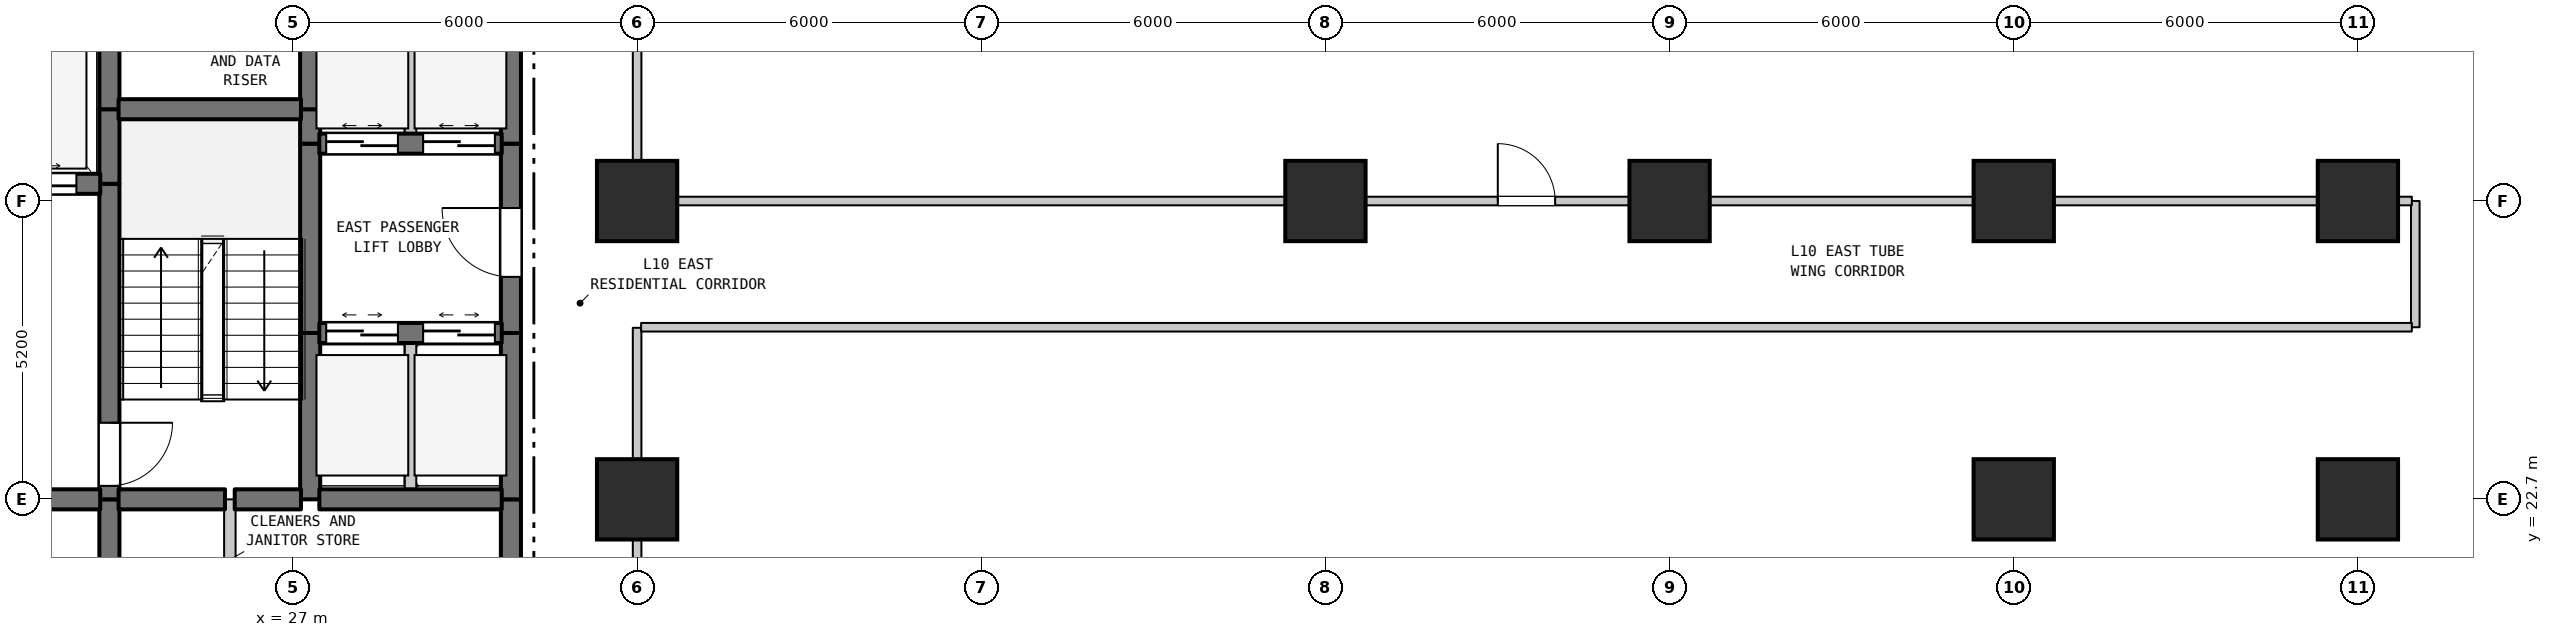
"""IFC4 building model, lengths in metres.
Left out: names, types, materials, properties, quantities, classifications, styles, units other than length and angle.
Written with IfcOpenShell. Run it as: python <this file> out.ifc"""

import sys

from ifc_helpers import new_model, si_unit, direction, frame, frame_2d, origin, origin_2d, place, context, subcontext, project, spatial, rectangle, extrude, element, fill, save


model = new_model("IFC4")
c1 = context("Model", 3, precision=1e-05, world=origin(), true_north=direction((0.0, 1.0)))
c2 = subcontext(c1, "Body", "Model", "MODEL_VIEW")
j1 = project(units=[si_unit("LENGTHUNIT", "METRE"), si_unit("PLANEANGLEUNIT", "RADIAN")], contexts=[c1])
p1 = place(None, origin())
s1 = spatial("IfcSite", under=j1, at=p1, CompositionType="ELEMENT")
p2 = place(p1, origin())
s2 = spatial("IfcBuilding", under=s1, at=p2, CompositionType="ELEMENT")
p3 = place(p2, frame((0.0, 0.0, 46.2)))
s3 = spatial("IfcBuildingStorey", under=s2, at=p3, CompositionType="ELEMENT", Elevation=46.2)
for number, where, z_axis, x_axis in (
    (1, (33.0, 22.7, 0.0), (0.0, 0.0, 1.0), (1.0, 0.0, 0.0)),
    (2, (33.0, 27.9, 0.0), (0.0, 0.0, 1.0), (1.0, 0.0, 0.0)),
    (3, (45.0, 27.9, 0.0), (0.0, 0.0, 1.0), (1.0, 0.0, 0.0)),
    (4, (51.0, 27.9, 0.0), (0.0, 0.0, 1.0), (1.0, 0.0, 0.0)),
    (5, (57.0, 22.7, 0.0), (0.0, 0.0, 1.0), (1.0, 0.0, 0.0)),
    (6, (57.0, 27.9, 0.0), (0.0, 0.0, 1.0), (1.0, 0.0, 0.0)),
    (7, (63.0, 22.7, 0.0), (0.0, 0.0, 1.0), (1.0, 0.0, 0.0)),
    (8, (63.0, 27.9, 0.0), (0.0, 0.0, 1.0), (1.0, 0.0, 0.0)),
):
    element("IfcColumn", number, at=place(p3, frame(where, z_axis=z_axis, x_axis=x_axis)), inside=s3, PredefinedType="COLUMN", context=c2, shape_type="SweptSolid", body=[
        extrude(rectangle(XDim=1.4, YDim=1.4, at=origin_2d()), origin(), (0.0, 0.0, 1.0), 3.7),
    ])
p4 = place(p3, frame((23.8, 19.5, 0.0), z_axis=(0.0, 0.0, 1.0), x_axis=(0.0, 1.0, 0.0)))
e9 = element("IfcWall", 9, at=p4, inside=s3, PredefinedType="SHEAR", context=c2, shape_type="SweptSolid", body=[
    extrude(rectangle(XDim=3.2, YDim=0.35, at=frame_2d((1.6, 0.0))), origin(), (0.0, 0.0, 1.0), 3.385),
])
p5 = place(p3, frame((23.8, 22.7, 0.0), z_axis=(0.0, 0.0, 1.0), x_axis=(0.0, 1.0, 0.0)))
e10 = element("IfcWall", 10, at=p5, inside=s3, PredefinedType="SHEAR", context=c2, shape_type="SweptSolid", body=[
    extrude(rectangle(XDim=5.5, YDim=0.35, at=frame_2d((2.75, 0.0))), origin(), (0.0, 0.0, 1.0), 3.385),
])
p6 = place(p5, frame((0.235, 0.0, 0.0)))
e11 = element("IfcOpeningElement", 11, at=p6, cuts=e10, PredefinedType="OPENING", context=c2, shape_type="SweptSolid", body=[
    extrude(rectangle(XDim=1.1, YDim=2.15, at=frame_2d((0.55, 1.075))), frame((0.0, 0.185, 0.0), z_axis=(0.0, -1.0, 0.0), x_axis=(1.0, 0.0, 0.0)), (0.0, 0.0, 1.0), 0.37),
])
for number, where, z_axis, x_axis in (
    (12, (23.8, 28.2, 0.0), (0.0, 0.0, 1.0), (0.0, 1.0, 0.0)),
    (13, (23.8, 29.5, 0.0), (0.0, 0.0, 1.0), (0.0, 1.0, 0.0)),
):
    element("IfcWall", number, at=place(p3, frame(where, z_axis=z_axis, x_axis=x_axis)), inside=s3, PredefinedType="SHEAR", context=c2, shape_type="SweptSolid", body=[
        extrude(rectangle(XDim=1.3, YDim=0.35, at=frame_2d((0.65, 0.0))), origin(), (0.0, 0.0, 1.0), 3.385),
    ])
p7 = place(p3, frame((25.9, 19.5, 0.0), z_axis=(0.0, 0.0, 1.0), x_axis=(0.0, 1.0, 0.0)))
e14 = element("IfcWall", 14, at=p7, inside=s3, PredefinedType="STANDARD", context=c2, shape_type="SweptSolid", body=[
    extrude(rectangle(XDim=3.2, YDim=0.2, at=frame_2d((1.6, 0.0))), origin(), (0.0, 0.0, 1.0), 3.385),
])
p8 = place(p3, frame((27.3, 22.7, 0.0), z_axis=(0.0, 0.0, 1.0), x_axis=(0.0, 1.0, 0.0)))
e15 = element("IfcWall", 15, at=p8, inside=s3, PredefinedType="SHEAR", context=c2, shape_type="SweptSolid", body=[
    extrude(rectangle(XDim=2.9, YDim=0.35, at=frame_2d((1.45, 0.0))), origin(), (0.0, 0.0, 1.0), 3.385),
])
p9 = place(p3, frame((27.3, 25.6, 0.0), z_axis=(0.0, 0.0, 1.0), x_axis=(0.0, 1.0, 0.0)))
e16 = element("IfcWall", 16, at=p9, inside=s3, PredefinedType="SHEAR", context=c2, shape_type="SweptSolid", body=[
    extrude(rectangle(XDim=3.3, YDim=0.35, at=frame_2d((1.65, 0.0))), origin(), (0.0, 0.0, 1.0), 3.385),
])
p10 = place(p3, frame((27.3, 28.9, 0.0), z_axis=(0.0, 0.0, 1.0), x_axis=(0.0, 1.0, 0.0)))
e17 = element("IfcWall", 17, at=p10, inside=s3, PredefinedType="SHEAR", context=c2, shape_type="SweptSolid", body=[
    extrude(rectangle(XDim=0.6, YDim=0.35, at=frame_2d((0.3, 0.0))), origin(), (0.0, 0.0, 1.0), 3.385),
])
p11 = place(p3, frame((27.3, 29.5, 0.0), z_axis=(0.0, 0.0, 1.0), x_axis=(0.0, 1.0, 0.0)))
e18 = element("IfcWall", 18, at=p11, inside=s3, PredefinedType="SHEAR", context=c2, shape_type="SweptSolid", body=[
    extrude(rectangle(XDim=2.0, YDim=0.35, at=frame_2d((1.0, 0.0))), origin(), (0.0, 0.0, 1.0), 3.385),
])
p12 = place(p3, frame((29.05, 22.7, 0.0), z_axis=(0.0, 0.0, 1.0), x_axis=(0.0, 1.0, 0.0)))
e19 = element("IfcWall", 19, at=p12, inside=s3, PredefinedType="STANDARD", context=c2, shape_type="SweptSolid", body=[
    extrude(rectangle(XDim=2.9, YDim=0.2, at=frame_2d((1.45, 0.0))), origin(), (0.0, 0.0, 1.0), 3.385),
])
p13 = place(p3, frame((29.05, 28.9, 0.0), z_axis=(0.0, 0.0, 1.0), x_axis=(0.0, 1.0, 0.0)))
e20 = element("IfcWall", 20, at=p13, inside=s3, PredefinedType="STANDARD", context=c2, shape_type="SweptSolid", body=[
    extrude(rectangle(XDim=2.6, YDim=0.2, at=frame_2d((1.3, 0.0))), origin(), (0.0, 0.0, 1.0), 3.385),
])
p14 = place(p3, frame((30.8, 19.65, 0.0), z_axis=(0.0, 0.0, 1.0), x_axis=(0.0, 1.0, 0.0)))
e21 = element("IfcWall", 21, at=p14, inside=s3, PredefinedType="SHEAR", context=c2, shape_type="SweptSolid", body=[
    extrude(rectangle(XDim=3.05, YDim=0.35, at=frame_2d((1.525, 0.0))), origin(), (0.0, 0.0, 1.0), 3.385),
])
p15 = place(p3, frame((30.8, 22.7, 0.0), z_axis=(0.0, 0.0, 1.0), x_axis=(0.0, 1.0, 0.0)))
e22 = element("IfcWall", 22, at=p15, inside=s3, PredefinedType="SHEAR", context=c2, shape_type="SweptSolid", body=[
    extrude(rectangle(XDim=2.9, YDim=0.35, at=frame_2d((1.45, 0.0))), origin(), (0.0, 0.0, 1.0), 3.385),
])
p16 = place(p3, frame((30.8, 25.6, 0.0), z_axis=(0.0, 0.0, 1.0), x_axis=(0.0, 1.0, 0.0)))
e23 = element("IfcWall", 23, at=p16, inside=s3, PredefinedType="SHEAR", context=c2, shape_type="SweptSolid", body=[
    extrude(rectangle(XDim=3.3, YDim=0.35, at=frame_2d((1.65, 0.0))), origin(), (0.0, 0.0, 1.0), 3.385),
])
p17 = place(p16, frame((0.978, 0.0, 0.0)))
e24 = element("IfcOpeningElement", 24, at=p17, cuts=e23, PredefinedType="OPENING", context=c2, shape_type="SweptSolid", body=[
    extrude(rectangle(XDim=1.2, YDim=2.2, at=frame_2d((0.6, 1.1))), frame((0.0, 0.185, 0.0), z_axis=(0.0, -1.0, 0.0), x_axis=(1.0, 0.0, 0.0)), (0.0, 0.0, 1.0), 0.37),
])
p18 = place(p3, frame((30.8, 28.9, 0.0), z_axis=(0.0, 0.0, 1.0), x_axis=(0.0, 1.0, 0.0)))
e25 = element("IfcWall", 25, at=p18, inside=s3, PredefinedType="SHEAR", context=c2, shape_type="SweptSolid", body=[
    extrude(rectangle(XDim=2.6, YDim=0.35, at=frame_2d((1.3, 0.0))), origin(), (0.0, 0.0, 1.0), 3.385),
])
p19 = place(p3, frame((33.0, 19.66, 0.0), z_axis=(0.0, 0.0, 1.0), x_axis=(0.0, 1.0, 0.0)))
e26 = element("IfcWall", 26, at=p19, inside=s3, PredefinedType="STANDARD", context=c2, shape_type="SweptSolid", body=[
    extrude(rectangle(XDim=6.03, YDim=0.15, at=frame_2d((3.015, 0.0))), origin(), (0.0, 0.0, 1.0), 2.885),
])
p20 = place(p3, frame((33.0, 27.91, 0.0), z_axis=(0.0, 0.0, 1.0), x_axis=(0.0, 1.0, 0.0)))
e27 = element("IfcWall", 27, at=p20, inside=s3, PredefinedType="STANDARD", context=c2, shape_type="SweptSolid", body=[
    extrude(rectangle(XDim=9.98, YDim=0.15, at=frame_2d((4.99, 0.0))), origin(), (0.0, 0.0, 1.0), 2.885),
])
p21 = place(p3, frame((64.0, 25.7, 0.0), z_axis=(0.0, 0.0, 1.0), x_axis=(0.0, 1.0, 0.0)))
e28 = element("IfcWall", 28, at=p21, inside=s3, PredefinedType="STANDARD", context=c2, shape_type="SweptSolid", body=[
    extrude(rectangle(XDim=2.2, YDim=0.15, at=frame_2d((1.1, 0.0))), origin(), (0.0, 0.0, 1.0), 3.385),
])
p22 = place(p3, frame((19.16, 22.7, 0.0), z_axis=(0.0, 0.0, 1.0), x_axis=(1.0, 0.0, 0.0)))
e29 = element("IfcWall", 29, at=p22, inside=s3, PredefinedType="SHEAR", context=c2, shape_type="SweptSolid", body=[
    extrude(rectangle(XDim=4.48, YDim=0.35, at=frame_2d((2.24, 0.0))), origin(), (0.0, 0.0, 1.0), 3.385),
])
p23 = place(p22, frame((1.64, 0.0, 0.0)))
e30 = element("IfcOpeningElement", 30, at=p23, cuts=e29, PredefinedType="OPENING", context=c2, shape_type="SweptSolid", body=[
    extrude(rectangle(XDim=1.2, YDim=2.2, at=frame_2d((0.6, 1.1))), frame((0.0, 0.185, 0.0), z_axis=(0.0, -1.0, 0.0), x_axis=(1.0, 0.0, 0.0)), (0.0, 0.0, 1.0), 0.37),
])
p24 = place(p3, frame((23.96, 22.7, 0.0), z_axis=(0.0, 0.0, 1.0), x_axis=(1.0, 0.0, 0.0)))
e31 = element("IfcWall", 31, at=p24, inside=s3, PredefinedType="SHEAR", context=c2, shape_type="SweptSolid", body=[
    extrude(rectangle(XDim=1.855, YDim=0.35, at=frame_2d((0.927, 0.0))), origin(), (0.0, 0.0, 1.0), 3.385),
])
p25 = place(p3, frame((25.985, 22.7, 0.0), z_axis=(0.0, 0.0, 1.0), x_axis=(1.0, 0.0, 0.0)))
e32 = element("IfcWall", 32, at=p25, inside=s3, PredefinedType="SHEAR", context=c2, shape_type="SweptSolid", body=[
    extrude(rectangle(XDim=1.155, YDim=0.35, at=frame_2d((0.577, 0.0))), origin(), (0.0, 0.0, 1.0), 3.385),
])
p26 = place(p3, frame((27.46, 22.7, 0.0), z_axis=(0.0, 0.0, 1.0), x_axis=(1.0, 0.0, 0.0)))
e33 = element("IfcWall", 33, at=p26, inside=s3, PredefinedType="SHEAR", context=c2, shape_type="SweptSolid", body=[
    extrude(rectangle(XDim=3.18, YDim=0.35, at=frame_2d((1.59, 0.0))), origin(), (0.0, 0.0, 1.0), 3.385),
])
p27 = place(p3, frame((27.46, 25.6, 0.0), z_axis=(0.0, 0.0, 1.0), x_axis=(1.0, 0.0, 0.0)))
e34 = element("IfcWall", 34, at=p27, inside=s3, PredefinedType="SHEAR", context=c2, shape_type="SweptSolid", body=[
    extrude(rectangle(XDim=3.18, YDim=0.35, at=frame_2d((1.59, 0.0))), origin(), (0.0, 0.0, 1.0), 3.385),
])
p28 = place(p27, frame((0.12, 0.0, 0.0)))
e35 = element("IfcOpeningElement", 35, at=p28, cuts=e34, PredefinedType="OPENING", context=c2, shape_type="SweptSolid", body=[
    extrude(rectangle(XDim=1.25, YDim=2.2, at=frame_2d((0.625, 1.1))), frame((0.0, 0.185, 0.0), z_axis=(0.0, -1.0, 0.0), x_axis=(1.0, 0.0, 0.0)), (0.0, 0.0, 1.0), 0.37),
])
p29 = place(p27, frame((1.81, 0.0, 0.0)))
e36 = element("IfcOpeningElement", 36, at=p29, cuts=e34, PredefinedType="OPENING", context=c2, shape_type="SweptSolid", body=[
    extrude(rectangle(XDim=1.25, YDim=2.2, at=frame_2d((0.625, 1.1))), frame((0.0, 0.185, 0.0), z_axis=(0.0, -1.0, 0.0), x_axis=(1.0, 0.0, 0.0)), (0.0, 0.0, 1.0), 0.37),
])
p30 = place(p3, frame((33.07, 25.7, 0.0), z_axis=(0.0, 0.0, 1.0), x_axis=(1.0, 0.0, 0.0)))
e37 = element("IfcWall", 37, at=p30, inside=s3, PredefinedType="STANDARD", context=c2, shape_type="SweptSolid", body=[
    extrude(rectangle(XDim=30.87, YDim=0.15, at=frame_2d((15.435, 0.0))), origin(), (0.0, 0.0, 1.0), 3.385),
])
p31 = place(p3, frame((33.07, 27.9, 0.0), z_axis=(0.0, 0.0, 1.0), x_axis=(1.0, 0.0, 0.0)))
e38 = element("IfcWall", 38, at=p31, inside=s3, PredefinedType="STANDARD", context=c2, shape_type="SweptSolid", body=[
    extrude(rectangle(XDim=30.87, YDim=0.15, at=frame_2d((15.435, 0.0))), origin(), (0.0, 0.0, 1.0), 2.885),
])
p32 = place(p31, frame((14.935, 0.0, 0.0)))
e39 = element("IfcOpeningElement", 39, at=p32, cuts=e38, PredefinedType="OPENING", context=c2, shape_type="SweptSolid", body=[
    extrude(rectangle(XDim=1.0, YDim=2.15, at=frame_2d((0.5, 1.075))), frame((0.0, 0.085, 0.0), z_axis=(0.0, -1.0, 0.0), x_axis=(1.0, 0.0, 0.0)), (0.0, 0.0, 1.0), 0.17),
])
p33 = place(p3, frame((19.16, 28.2, 0.0), z_axis=(0.0, 0.0, 1.0), x_axis=(1.0, 0.0, 0.0)))
e40 = element("IfcWall", 40, at=p33, inside=s3, PredefinedType="SHEAR", context=c2, shape_type="SweptSolid", body=[
    extrude(rectangle(XDim=4.48, YDim=0.35, at=frame_2d((2.24, 0.0))), origin(), (0.0, 0.0, 1.0), 3.385),
])
p34 = place(p33, frame((0.415, 0.0, 0.0)))
e41 = element("IfcOpeningElement", 41, at=p34, cuts=e40, PredefinedType="OPENING", context=c2, shape_type="SweptSolid", body=[
    extrude(rectangle(XDim=1.25, YDim=2.2, at=frame_2d((0.625, 1.1))), frame((0.0, 0.185, 0.0), z_axis=(0.0, -1.0, 0.0), x_axis=(1.0, 0.0, 0.0)), (0.0, 0.0, 1.0), 0.37),
])
p35 = place(p33, frame((2.815, 0.0, 0.0)))
e42 = element("IfcOpeningElement", 42, at=p35, cuts=e40, PredefinedType="OPENING", context=c2, shape_type="SweptSolid", body=[
    extrude(rectangle(XDim=1.25, YDim=2.2, at=frame_2d((0.625, 1.1))), frame((0.0, 0.185, 0.0), z_axis=(0.0, -1.0, 0.0), x_axis=(1.0, 0.0, 0.0)), (0.0, 0.0, 1.0), 0.37),
])
p36 = place(p3, frame((27.46, 28.9, 0.0), z_axis=(0.0, 0.0, 1.0), x_axis=(1.0, 0.0, 0.0)))
e43 = element("IfcWall", 43, at=p36, inside=s3, PredefinedType="SHEAR", context=c2, shape_type="SweptSolid", body=[
    extrude(rectangle(XDim=3.18, YDim=0.35, at=frame_2d((1.59, 0.0))), origin(), (0.0, 0.0, 1.0), 3.385),
])
p37 = place(p36, frame((0.12, 0.0, 0.0)))
e44 = element("IfcOpeningElement", 44, at=p37, cuts=e43, PredefinedType="OPENING", context=c2, shape_type="SweptSolid", body=[
    extrude(rectangle(XDim=1.25, YDim=2.2, at=frame_2d((0.625, 1.1))), frame((0.0, 0.185, 0.0), z_axis=(0.0, -1.0, 0.0), x_axis=(1.0, 0.0, 0.0)), (0.0, 0.0, 1.0), 0.37),
])
p38 = place(p36, frame((1.81, 0.0, 0.0)))
e45 = element("IfcOpeningElement", 45, at=p38, cuts=e43, PredefinedType="OPENING", context=c2, shape_type="SweptSolid", body=[
    extrude(rectangle(XDim=1.25, YDim=2.2, at=frame_2d((0.625, 1.1))), frame((0.0, 0.185, 0.0), z_axis=(0.0, -1.0, 0.0), x_axis=(1.0, 0.0, 0.0)), (0.0, 0.0, 1.0), 0.37),
])
p39 = place(p3, frame((23.96, 29.5, 0.0), z_axis=(0.0, 0.0, 1.0), x_axis=(1.0, 0.0, 0.0)))
e46 = element("IfcWall", 46, at=p39, inside=s3, PredefinedType="SHEAR", context=c2, shape_type="SweptSolid", body=[
    extrude(rectangle(XDim=3.18, YDim=0.35, at=frame_2d((1.59, 0.0))), origin(), (0.0, 0.0, 1.0), 3.385),
])
p40 = place(p6, frame((1.1, 0.0, 0.0), z_axis=(0.0, 0.0, 1.0), x_axis=(-1.0, 0.0, 0.0)))
e47 = element("IfcDoor", 47, at=p40, inside=s3, OperationType="SINGLE_SWING_RIGHT", PredefinedType="DOOR", context=c2, shape_type="SweptSolid", body=[
    extrude(rectangle(XDim=1.1, YDim=2.15, at=frame_2d((0.55, 1.075))), frame((0.0, 0.025, 0.0), z_axis=(0.0, -1.0, 0.0), x_axis=(1.0, 0.0, 0.0)), (0.0, 0.0, 1.0), 0.05),
])
fill(e11, e47)
p41 = place(p17, origin())
e48 = element("IfcDoor", 48, at=p41, inside=s3, OperationType="SINGLE_SWING_RIGHT", PredefinedType="DOOR", context=c2, shape_type="SweptSolid", body=[
    extrude(rectangle(XDim=1.2, YDim=2.2, at=frame_2d((0.6, 1.1))), frame((0.0, 0.025, 0.0), z_axis=(0.0, -1.0, 0.0), x_axis=(1.0, 0.0, 0.0)), (0.0, 0.0, 1.0), 0.05),
])
fill(e24, e48)
p42 = place(p28, origin())
e49 = element("IfcDoor", 49, at=p42, inside=s3, OperationType="DOUBLE_DOOR_SLIDING", PredefinedType="DOOR", context=c2, shape_type="SweptSolid", body=[
    extrude(rectangle(XDim=1.25, YDim=2.2, at=frame_2d((0.625, 1.1))), frame((0.0, 0.025, 0.0), z_axis=(0.0, -1.0, 0.0), x_axis=(1.0, 0.0, 0.0)), (0.0, 0.0, 1.0), 0.05),
])
fill(e35, e49)
p43 = place(p29, origin())
e50 = element("IfcDoor", 50, at=p43, inside=s3, OperationType="DOUBLE_DOOR_SLIDING", PredefinedType="DOOR", context=c2, shape_type="SweptSolid", body=[
    extrude(rectangle(XDim=1.25, YDim=2.2, at=frame_2d((0.625, 1.1))), frame((0.0, 0.025, 0.0), z_axis=(0.0, -1.0, 0.0), x_axis=(1.0, 0.0, 0.0)), (0.0, 0.0, 1.0), 0.05),
])
fill(e36, e50)
p44 = place(p32, origin())
e51 = element("IfcDoor", 51, at=p44, inside=s3, OperationType="SINGLE_SWING_LEFT", PredefinedType="DOOR", context=c2, shape_type="SweptSolid", body=[
    extrude(rectangle(XDim=1.0, YDim=2.15, at=frame_2d((0.5, 1.075))), frame((0.0, 0.025, 0.0), z_axis=(0.0, -1.0, 0.0), x_axis=(1.0, 0.0, 0.0)), (0.0, 0.0, 1.0), 0.05),
])
fill(e39, e51)
p45 = place(p35, origin())
e52 = element("IfcDoor", 52, at=p45, inside=s3, OperationType="DOUBLE_DOOR_SLIDING", PredefinedType="DOOR", context=c2, shape_type="SweptSolid", body=[
    extrude(rectangle(XDim=1.25, YDim=2.2, at=frame_2d((0.625, 1.1))), frame((0.0, 0.025, 0.0), z_axis=(0.0, -1.0, 0.0), x_axis=(1.0, 0.0, 0.0)), (0.0, 0.0, 1.0), 0.05),
])
fill(e42, e52)
p46 = place(p37, origin())
e53 = element("IfcDoor", 53, at=p46, inside=s3, OperationType="DOUBLE_DOOR_SLIDING", PredefinedType="DOOR", context=c2, shape_type="SweptSolid", body=[
    extrude(rectangle(XDim=1.25, YDim=2.2, at=frame_2d((0.625, 1.1))), frame((0.0, 0.025, 0.0), z_axis=(0.0, -1.0, 0.0), x_axis=(1.0, 0.0, 0.0)), (0.0, 0.0, 1.0), 0.05),
])
fill(e44, e53)
p47 = place(p38, origin())
e54 = element("IfcDoor", 54, at=p47, inside=s3, OperationType="DOUBLE_DOOR_SLIDING", PredefinedType="DOOR", context=c2, shape_type="SweptSolid", body=[
    extrude(rectangle(XDim=1.25, YDim=2.2, at=frame_2d((0.625, 1.1))), frame((0.0, 0.025, 0.0), z_axis=(0.0, -1.0, 0.0), x_axis=(1.0, 0.0, 0.0)), (0.0, 0.0, 1.0), 0.05),
])
fill(e45, e54)
save(model, sys.argv[1])
